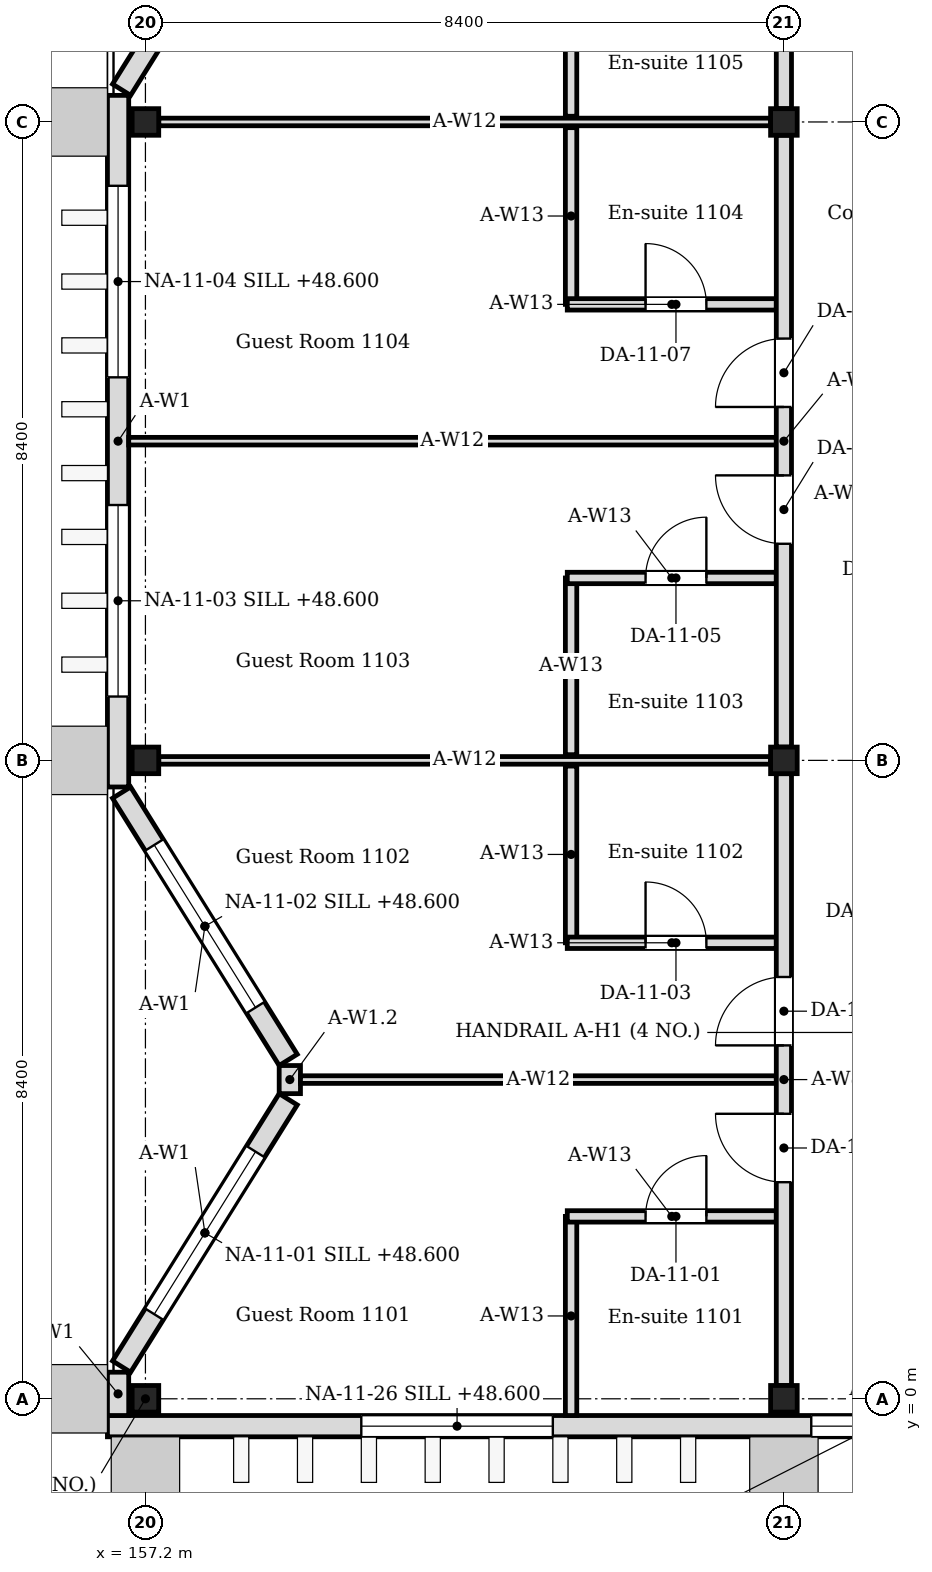
"""IFC4 building model, lengths in metres.
Left out: names, types, materials, properties, quantities, classifications, styles, units other than length and angle.
Written with IfcOpenShell. Run it as: python <this file> out.ifc"""

import sys

from ifc_helpers import new_model, si_unit, direction, frame, frame_2d, origin, origin_2d, place, context, subcontext, project, spatial, rectangle, i_section, extrude, element, fill, save


model = new_model("IFC4")
c1 = context("Model", 3, precision=1e-05, world=origin(), true_north=direction((0.0, 1.0)))
c2 = subcontext(c1, "Body", "Model", "MODEL_VIEW")
j1 = project(units=[si_unit("LENGTHUNIT", "METRE"), si_unit("PLANEANGLEUNIT", "RADIAN")], contexts=[c1])
p1 = place(None, origin())
s1 = spatial("IfcSite", under=j1, at=p1, CompositionType="ELEMENT")
p2 = place(p1, origin())
s2 = spatial("IfcBuilding", under=s1, at=p2, CompositionType="ELEMENT")
p3 = place(p2, frame((0.0, 0.0, 48.0)))
s3 = spatial("IfcBuildingStorey", under=s2, at=p3, CompositionType="ELEMENT", Elevation=48.0)
for number, where, z_axis, x_axis in (
    (1, (157.2, 0.0, 0.0), (0.0, 0.0, 1.0), (1.0, 0.0, 0.0)),
    (2, (157.2, 8.4, 0.0), (0.0, 0.0, 1.0), (1.0, 0.0, 0.0)),
    (3, (157.2, 16.8, 0.0), (0.0, 0.0, 1.0), (1.0, 0.0, 0.0)),
    (4, (165.6, 0.0, 0.0), (0.0, 0.0, 1.0), (1.0, 0.0, 0.0)),
    (5, (165.6, 8.4, 0.0), (0.0, 0.0, 1.0), (1.0, 0.0, 0.0)),
    (6, (165.6, 16.8, 0.0), (0.0, 0.0, 1.0), (1.0, 0.0, 0.0)),
):
    element("IfcColumn", number, at=place(p3, frame(where, z_axis=z_axis, x_axis=x_axis)), inside=s3, PredefinedType="COLUMN", context=c2, shape_type="SweptSolid", body=[
        extrude(i_section(OverallWidth=0.35, OverallDepth=0.35, WebThickness=0.012, FlangeThickness=0.019, FilletRadius=0.013, at=origin_2d()), origin(), (0.0, 0.0, 1.0), 4.2),
    ])
p4 = place(p3, frame((156.84, -0.22, 0.0), z_axis=(0.0, 0.0, 1.0), x_axis=(0.0, 1.0, 0.0)))
e7 = element("IfcWall", 7, at=p4, inside=s3, PredefinedType="SOLIDWALL", context=c2, shape_type="SweptSolid", body=[
    extrude(rectangle(XDim=0.57, YDim=0.28, at=frame_2d((0.285, 0.0))), origin(), (0.0, 0.0, 1.0), 4.05),
])
p5 = place(p3, frame((156.886, 0.424, 0.0), z_axis=(0.0, 0.0, 1.0), x_axis=(0.529018946142, 0.848610013271, 0.0)))
e8 = element("IfcWall", 8, at=p5, inside=s3, PredefinedType="SOLIDWALL", context=c2, shape_type="SweptSolid", body=[
    extrude(rectangle(XDim=4.144, YDim=0.28, at=frame_2d((2.072, 0.0))), origin(), (0.0, 0.0, 1.0), 4.05),
])
p6 = place(p5, frame((0.812, 0.0, 0.6)))
e9 = element("IfcOpeningElement", 9, at=p6, cuts=e8, PredefinedType="OPENING", context=c2, shape_type="SweptSolid", body=[
    extrude(rectangle(XDim=2.52, YDim=2.4, at=frame_2d((1.26, 1.2))), frame((0.0, 0.15, 0.0), z_axis=(0.0, -1.0, 0.0), x_axis=(1.0, 0.0, 0.0)), (0.0, 0.0, 1.0), 0.3),
])
p7 = place(p3, frame((159.079, 4.459, 0.0), z_axis=(0.0, 0.0, 1.0), x_axis=(-0.529018946142, 0.848610013271, 0.0)))
e10 = element("IfcWall", 10, at=p7, inside=s3, PredefinedType="SOLIDWALL", context=c2, shape_type="SweptSolid", body=[
    extrude(rectangle(XDim=4.144, YDim=0.28, at=frame_2d((2.072, 0.0))), origin(), (0.0, 0.0, 1.0), 4.05),
])
p8 = place(p7, frame((0.812, 0.0, 0.6)))
e11 = element("IfcOpeningElement", 11, at=p8, cuts=e10, PredefinedType="OPENING", context=c2, shape_type="SweptSolid", body=[
    extrude(rectangle(XDim=2.52, YDim=2.4, at=frame_2d((1.26, 1.2))), frame((0.0, 0.15, 0.0), z_axis=(0.0, -1.0, 0.0), x_axis=(1.0, 0.0, 0.0)), (0.0, 0.0, 1.0), 0.3),
])
p9 = place(p3, frame((159.1, 4.015, 0.0), z_axis=(0.0, 0.0, 1.0), x_axis=(0.0, 1.0, 0.0)))
e12 = element("IfcWall", 12, at=p9, inside=s3, PredefinedType="SOLIDWALL", context=c2, shape_type="SweptSolid", body=[
    extrude(rectangle(XDim=0.37, YDim=0.28, at=frame_2d((0.185, 0.0))), origin(), (0.0, 0.0, 1.0), 3.604),
])
p10 = place(p3, frame((156.84, 8.05, 0.0), z_axis=(0.0, 0.0, 1.0), x_axis=(0.0, 1.0, 0.0)))
e13 = element("IfcWall", 13, at=p10, inside=s3, PredefinedType="SOLIDWALL", context=c2, shape_type="SweptSolid", body=[
    extrude(rectangle(XDim=9.1, YDim=0.28, at=frame_2d((4.55, 0.0))), origin(), (0.0, 0.0, 1.0), 4.05),
])
p11 = place(p10, frame((1.19, 0.0, 0.6)))
e14 = element("IfcOpeningElement", 14, at=p11, cuts=e13, PredefinedType="OPENING", context=c2, shape_type="SweptSolid", body=[
    extrude(rectangle(XDim=2.52, YDim=2.4, at=frame_2d((1.26, 1.2))), frame((0.0, 0.15, 0.0), z_axis=(0.0, -1.0, 0.0), x_axis=(1.0, 0.0, 0.0)), (0.0, 0.0, 1.0), 0.3),
])
p12 = place(p10, frame((5.39, 0.0, 0.6)))
e15 = element("IfcOpeningElement", 15, at=p12, cuts=e13, PredefinedType="OPENING", context=c2, shape_type="SweptSolid", body=[
    extrude(rectangle(XDim=2.52, YDim=2.4, at=frame_2d((1.26, 1.2))), frame((0.0, 0.15, 0.0), z_axis=(0.0, -1.0, 0.0), x_axis=(1.0, 0.0, 0.0)), (0.0, 0.0, 1.0), 0.3),
])
p13 = place(p3, frame((156.886, 17.224, 0.0), z_axis=(0.0, 0.0, 1.0), x_axis=(0.529018946142, 0.848610013271, 0.0)))
e16 = element("IfcWall", 16, at=p13, inside=s3, PredefinedType="SOLIDWALL", context=c2, shape_type="SweptSolid", body=[
    extrude(rectangle(XDim=4.144, YDim=0.28, at=frame_2d((2.072, 0.0))), origin(), (0.0, 0.0, 1.0), 4.05),
])
p14 = place(p13, frame((0.812, 0.0, 0.6)))
e17 = element("IfcOpeningElement", 17, at=p14, cuts=e16, PredefinedType="OPENING", context=c2, shape_type="SweptSolid", body=[
    extrude(rectangle(XDim=2.52, YDim=2.4, at=frame_2d((1.26, 1.2))), frame((0.0, 0.15, 0.0), z_axis=(0.0, -1.0, 0.0), x_axis=(1.0, 0.0, 0.0)), (0.0, 0.0, 1.0), 0.3),
])
p15 = place(p3, frame((156.7, -0.36, 0.0), z_axis=(0.0, 0.0, 1.0), x_axis=(1.0, 0.0, 0.0)))
e18 = element("IfcWall", 18, at=p15, inside=s3, PredefinedType="SOLIDWALL", context=c2, shape_type="SweptSolid", body=[
    extrude(rectangle(XDim=20.2, YDim=0.28, at=frame_2d((10.1, 0.0))), origin(), (0.0, 0.0, 1.0), 4.05),
])
p16 = place(p15, frame((9.26, 0.0, 0.6)))
e19 = element("IfcOpeningElement", 19, at=p16, cuts=e18, PredefinedType="OPENING", context=c2, shape_type="SweptSolid", body=[
    extrude(rectangle(XDim=1.68, YDim=2.4, at=frame_2d((0.84, 1.2))), frame((0.0, 0.15, 0.0), z_axis=(0.0, -1.0, 0.0), x_axis=(1.0, 0.0, 0.0)), (0.0, 0.0, 1.0), 0.3),
])
p17 = place(p15, frame((3.34, 0.0, 0.6)))
e20 = element("IfcOpeningElement", 20, at=p17, cuts=e18, PredefinedType="OPENING", context=c2, shape_type="SweptSolid", body=[
    extrude(rectangle(XDim=2.52, YDim=2.4, at=frame_2d((1.26, 1.2))), frame((0.0, 0.15, 0.0), z_axis=(0.0, -1.0, 0.0), x_axis=(1.0, 0.0, 0.0)), (0.0, 0.0, 1.0), 0.3),
])
p18 = place(p3, frame((162.8, -0.22, 0.0), z_axis=(0.0, 0.0, 1.0), x_axis=(0.0, 1.0, 0.0)))
e21 = element("IfcWall", 21, at=p18, inside=s3, PredefinedType="PARTITIONING", context=c2, shape_type="SweptSolid", body=[
    extrude(rectangle(XDim=2.62, YDim=0.15, at=frame_2d((1.31, 0.0))), origin(), (0.0, 0.0, 1.0), 4.05),
])
p19 = place(p3, frame((162.75, 2.4, 0.0), z_axis=(0.0, 0.0, 1.0), x_axis=(1.0, 0.0, 0.0)))
e22 = element("IfcWall", 22, at=p19, inside=s3, PredefinedType="PARTITIONING", context=c2, shape_type="SweptSolid", body=[
    extrude(rectangle(XDim=2.75, YDim=0.15, at=frame_2d((1.375, 0.0))), origin(), (0.0, 0.0, 1.0), 4.05),
])
p20 = place(p19, frame((1.03, 0.0, 0.0)))
e23 = element("IfcOpeningElement", 23, at=p20, cuts=e22, PredefinedType="OPENING", context=c2, shape_type="SweptSolid", body=[
    extrude(rectangle(XDim=0.8, YDim=2.1, at=frame_2d((0.4, 1.05))), frame((0.0, 0.085, 0.0), z_axis=(0.0, -1.0, 0.0), x_axis=(1.0, 0.0, 0.0)), (0.0, 0.0, 1.0), 0.17),
])
p21 = place(p3, frame((162.8, 6.0, 0.0), z_axis=(0.0, 0.0, 1.0), x_axis=(0.0, 1.0, 0.0)))
e24 = element("IfcWall", 24, at=p21, inside=s3, PredefinedType="PARTITIONING", context=c2, shape_type="SweptSolid", body=[
    extrude(rectangle(XDim=2.325, YDim=0.15, at=frame_2d((1.163, 0.0))), origin(), (0.0, 0.0, 1.0), 4.05),
])
p22 = place(p3, frame((162.75, 6.0, 0.0), z_axis=(0.0, 0.0, 1.0), x_axis=(1.0, 0.0, 0.0)))
e25 = element("IfcWall", 25, at=p22, inside=s3, PredefinedType="PARTITIONING", context=c2, shape_type="SweptSolid", body=[
    extrude(rectangle(XDim=2.75, YDim=0.15, at=frame_2d((1.375, 0.0))), origin(), (0.0, 0.0, 1.0), 4.05),
])
p23 = place(p22, frame((1.03, 0.0, 0.0)))
e26 = element("IfcOpeningElement", 26, at=p23, cuts=e25, PredefinedType="OPENING", context=c2, shape_type="SweptSolid", body=[
    extrude(rectangle(XDim=0.8, YDim=2.1, at=frame_2d((0.4, 1.05))), frame((0.0, 0.085, 0.0), z_axis=(0.0, -1.0, 0.0), x_axis=(1.0, 0.0, 0.0)), (0.0, 0.0, 1.0), 0.17),
])
p24 = place(p3, frame((162.8, 8.475, 0.0), z_axis=(0.0, 0.0, 1.0), x_axis=(0.0, 1.0, 0.0)))
e27 = element("IfcWall", 27, at=p24, inside=s3, PredefinedType="PARTITIONING", context=c2, shape_type="SweptSolid", body=[
    extrude(rectangle(XDim=2.325, YDim=0.15, at=frame_2d((1.163, 0.0))), origin(), (0.0, 0.0, 1.0), 4.05),
])
p25 = place(p3, frame((162.75, 10.8, 0.0), z_axis=(0.0, 0.0, 1.0), x_axis=(1.0, 0.0, 0.0)))
e28 = element("IfcWall", 28, at=p25, inside=s3, PredefinedType="PARTITIONING", context=c2, shape_type="SweptSolid", body=[
    extrude(rectangle(XDim=2.75, YDim=0.15, at=frame_2d((1.375, 0.0))), origin(), (0.0, 0.0, 1.0), 4.05),
])
p26 = place(p25, frame((1.03, 0.0, 0.0)))
e29 = element("IfcOpeningElement", 29, at=p26, cuts=e28, PredefinedType="OPENING", context=c2, shape_type="SweptSolid", body=[
    extrude(rectangle(XDim=0.8, YDim=2.1, at=frame_2d((0.4, 1.05))), frame((0.0, 0.085, 0.0), z_axis=(0.0, -1.0, 0.0), x_axis=(1.0, 0.0, 0.0)), (0.0, 0.0, 1.0), 0.17),
])
p27 = place(p3, frame((162.8, 14.4, 0.0), z_axis=(0.0, 0.0, 1.0), x_axis=(0.0, 1.0, 0.0)))
e30 = element("IfcWall", 30, at=p27, inside=s3, PredefinedType="PARTITIONING", context=c2, shape_type="SweptSolid", body=[
    extrude(rectangle(XDim=2.325, YDim=0.15, at=frame_2d((1.163, 0.0))), origin(), (0.0, 0.0, 1.0), 4.05),
])
p28 = place(p3, frame((162.75, 14.4, 0.0), z_axis=(0.0, 0.0, 1.0), x_axis=(1.0, 0.0, 0.0)))
e31 = element("IfcWall", 31, at=p28, inside=s3, PredefinedType="PARTITIONING", context=c2, shape_type="SweptSolid", body=[
    extrude(rectangle(XDim=2.75, YDim=0.15, at=frame_2d((1.375, 0.0))), origin(), (0.0, 0.0, 1.0), 4.05),
])
p29 = place(p28, frame((1.03, 0.0, 0.0)))
e32 = element("IfcOpeningElement", 32, at=p29, cuts=e31, PredefinedType="OPENING", context=c2, shape_type="SweptSolid", body=[
    extrude(rectangle(XDim=0.8, YDim=2.1, at=frame_2d((0.4, 1.05))), frame((0.0, 0.085, 0.0), z_axis=(0.0, -1.0, 0.0), x_axis=(1.0, 0.0, 0.0)), (0.0, 0.0, 1.0), 0.17),
])
p30 = place(p3, frame((162.8, 16.875, 0.0), z_axis=(0.0, 0.0, 1.0), x_axis=(0.0, 1.0, 0.0)))
e33 = element("IfcWall", 33, at=p30, inside=s3, PredefinedType="PARTITIONING", context=c2, shape_type="SweptSolid", body=[
    extrude(rectangle(XDim=2.325, YDim=0.15, at=frame_2d((1.163, 0.0))), origin(), (0.0, 0.0, 1.0), 4.05),
])
for number, where, z_axis, x_axis in (
    (34, (157.375, 8.4, 0.0), (0.0, 0.0, 1.0), (1.0, 0.0, 0.0)),
    (35, (157.375, 16.8, 0.0), (0.0, 0.0, 1.0), (1.0, 0.0, 0.0)),
):
    element("IfcWall", number, at=place(p3, frame(where, z_axis=z_axis, x_axis=x_axis)), inside=s3, PredefinedType="PARTITIONING", context=c2, shape_type="SweptSolid", body=[
        extrude(rectangle(XDim=8.05, YDim=0.1, at=frame_2d((4.025, 0.0))), origin(), (0.0, 0.0, 1.0), 3.604),
    ])
p31 = place(p3, frame((159.24, 4.2, 0.0), z_axis=(0.0, 0.0, 1.0), x_axis=(1.0, 0.0, 0.0)))
e36 = element("IfcWall", 36, at=p31, inside=s3, PredefinedType="PARTITIONING", context=c2, shape_type="SweptSolid", body=[
    extrude(rectangle(XDim=6.26, YDim=0.1, at=frame_2d((3.13, 0.0))), origin(), (0.0, 0.0, 1.0), 3.604),
])
p32 = place(p3, frame((156.98, 12.6, 0.0), z_axis=(0.0, 0.0, 1.0), x_axis=(1.0, 0.0, 0.0)))
e37 = element("IfcWall", 37, at=p32, inside=s3, PredefinedType="PARTITIONING", context=c2, shape_type="SweptSolid", body=[
    extrude(rectangle(XDim=8.52, YDim=0.1, at=frame_2d((4.26, 0.0))), origin(), (0.0, 0.0, 1.0), 3.604),
])
p33 = place(p3, frame((165.6, 0.175, 0.0), z_axis=(0.0, 0.0, 1.0), x_axis=(0.0, 1.0, 0.0)))
e38 = element("IfcWall", 38, at=p33, inside=s3, PredefinedType="PARTITIONING", context=c2, shape_type="SweptSolid", body=[
    extrude(rectangle(XDim=8.05, YDim=0.2, at=frame_2d((4.025, 0.0))), origin(), (0.0, 0.0, 1.0), 3.45),
])
p34 = place(p33, frame((2.675, 0.0, 0.0)))
e39 = element("IfcOpeningElement", 39, at=p34, cuts=e38, PredefinedType="OPENING", context=c2, shape_type="SweptSolid", body=[
    extrude(rectangle(XDim=0.9, YDim=2.1, at=frame_2d((0.45, 1.05))), frame((0.0, 0.11, 0.0), z_axis=(0.0, -1.0, 0.0), x_axis=(1.0, 0.0, 0.0)), (0.0, 0.0, 1.0), 0.22),
])
p35 = place(p33, frame((4.475, 0.0, 0.0)))
e40 = element("IfcOpeningElement", 40, at=p35, cuts=e38, PredefinedType="OPENING", context=c2, shape_type="SweptSolid", body=[
    extrude(rectangle(XDim=0.9, YDim=2.1, at=frame_2d((0.45, 1.05))), frame((0.0, 0.11, 0.0), z_axis=(0.0, -1.0, 0.0), x_axis=(1.0, 0.0, 0.0)), (0.0, 0.0, 1.0), 0.22),
])
p36 = place(p3, frame((165.6, 8.575, 0.0), z_axis=(0.0, 0.0, 1.0), x_axis=(0.0, 1.0, 0.0)))
e41 = element("IfcWall", 41, at=p36, inside=s3, PredefinedType="PARTITIONING", context=c2, shape_type="SweptSolid", body=[
    extrude(rectangle(XDim=8.05, YDim=0.2, at=frame_2d((4.025, 0.0))), origin(), (0.0, 0.0, 1.0), 3.45),
])
p37 = place(p36, frame((2.675, 0.0, 0.0)))
e42 = element("IfcOpeningElement", 42, at=p37, cuts=e41, PredefinedType="OPENING", context=c2, shape_type="SweptSolid", body=[
    extrude(rectangle(XDim=0.9, YDim=2.1, at=frame_2d((0.45, 1.05))), frame((0.0, 0.11, 0.0), z_axis=(0.0, -1.0, 0.0), x_axis=(1.0, 0.0, 0.0)), (0.0, 0.0, 1.0), 0.22),
])
p38 = place(p36, frame((4.475, 0.0, 0.0)))
e43 = element("IfcOpeningElement", 43, at=p38, cuts=e41, PredefinedType="OPENING", context=c2, shape_type="SweptSolid", body=[
    extrude(rectangle(XDim=0.9, YDim=2.1, at=frame_2d((0.45, 1.05))), frame((0.0, 0.11, 0.0), z_axis=(0.0, -1.0, 0.0), x_axis=(1.0, 0.0, 0.0)), (0.0, 0.0, 1.0), 0.22),
])
p39 = place(p3, frame((165.6, 16.975, 0.0), z_axis=(0.0, 0.0, 1.0), x_axis=(0.0, 1.0, 0.0)))
e44 = element("IfcWall", 44, at=p39, inside=s3, PredefinedType="PARTITIONING", context=c2, shape_type="SweptSolid", body=[
    extrude(rectangle(XDim=8.05, YDim=0.2, at=frame_2d((4.025, 0.0))), origin(), (0.0, 0.0, 1.0), 3.45),
])
p40 = place(p39, frame((2.675, 0.0, 0.0)))
e45 = element("IfcOpeningElement", 45, at=p40, cuts=e44, PredefinedType="OPENING", context=c2, shape_type="SweptSolid", body=[
    extrude(rectangle(XDim=0.9, YDim=2.1, at=frame_2d((0.45, 1.05))), frame((0.0, 0.11, 0.0), z_axis=(0.0, -1.0, 0.0), x_axis=(1.0, 0.0, 0.0)), (0.0, 0.0, 1.0), 0.22),
])
p41 = place(p39, frame((4.475, 0.0, 0.0)))
e46 = element("IfcOpeningElement", 46, at=p41, cuts=e44, PredefinedType="OPENING", context=c2, shape_type="SweptSolid", body=[
    extrude(rectangle(XDim=0.9, YDim=2.1, at=frame_2d((0.45, 1.05))), frame((0.0, 0.11, 0.0), z_axis=(0.0, -1.0, 0.0), x_axis=(1.0, 0.0, 0.0)), (0.0, 0.0, 1.0), 0.22),
])
p42 = place(p6, origin())
e47 = element("IfcWindow", 47, at=p42, inside=s3, PartitioningType="SINGLE_PANEL", PredefinedType="WINDOW", context=c2, shape_type="SweptSolid", body=[
    extrude(rectangle(XDim=2.52, YDim=2.4, at=frame_2d((1.26, 1.2))), frame((0.0, 0.03, 0.0), z_axis=(0.0, -1.0, 0.0), x_axis=(1.0, 0.0, 0.0)), (0.0, 0.0, 1.0), 0.06),
])
fill(e9, e47)
p43 = place(p8, origin())
e48 = element("IfcWindow", 48, at=p43, inside=s3, PartitioningType="SINGLE_PANEL", PredefinedType="WINDOW", context=c2, shape_type="SweptSolid", body=[
    extrude(rectangle(XDim=2.52, YDim=2.4, at=frame_2d((1.26, 1.2))), frame((0.0, 0.03, 0.0), z_axis=(0.0, -1.0, 0.0), x_axis=(1.0, 0.0, 0.0)), (0.0, 0.0, 1.0), 0.06),
])
fill(e11, e48)
p44 = place(p11, origin())
e49 = element("IfcWindow", 49, at=p44, inside=s3, PartitioningType="SINGLE_PANEL", PredefinedType="WINDOW", context=c2, shape_type="SweptSolid", body=[
    extrude(rectangle(XDim=2.52, YDim=2.4, at=frame_2d((1.26, 1.2))), frame((0.0, 0.03, 0.0), z_axis=(0.0, -1.0, 0.0), x_axis=(1.0, 0.0, 0.0)), (0.0, 0.0, 1.0), 0.06),
])
fill(e14, e49)
p45 = place(p12, origin())
e50 = element("IfcWindow", 50, at=p45, inside=s3, PartitioningType="SINGLE_PANEL", PredefinedType="WINDOW", context=c2, shape_type="SweptSolid", body=[
    extrude(rectangle(XDim=2.52, YDim=2.4, at=frame_2d((1.26, 1.2))), frame((0.0, 0.03, 0.0), z_axis=(0.0, -1.0, 0.0), x_axis=(1.0, 0.0, 0.0)), (0.0, 0.0, 1.0), 0.06),
])
fill(e15, e50)
p46 = place(p16, origin())
e51 = element("IfcWindow", 51, at=p46, inside=s3, PartitioningType="SINGLE_PANEL", PredefinedType="WINDOW", context=c2, shape_type="SweptSolid", body=[
    extrude(rectangle(XDim=1.68, YDim=2.4, at=frame_2d((0.84, 1.2))), frame((0.0, 0.03, 0.0), z_axis=(0.0, -1.0, 0.0), x_axis=(1.0, 0.0, 0.0)), (0.0, 0.0, 1.0), 0.06),
])
fill(e19, e51)
p47 = place(p17, origin())
e52 = element("IfcWindow", 52, at=p47, inside=s3, PartitioningType="SINGLE_PANEL", PredefinedType="WINDOW", context=c2, shape_type="SweptSolid", body=[
    extrude(rectangle(XDim=2.52, YDim=2.4, at=frame_2d((1.26, 1.2))), frame((0.0, 0.03, 0.0), z_axis=(0.0, -1.0, 0.0), x_axis=(1.0, 0.0, 0.0)), (0.0, 0.0, 1.0), 0.06),
])
fill(e20, e52)
p48 = place(p20, origin())
e53 = element("IfcDoor", 53, at=p48, inside=s3, OperationType="SINGLE_SWING_RIGHT", PredefinedType="DOOR", context=c2, shape_type="SweptSolid", body=[
    extrude(rectangle(XDim=0.8, YDim=2.1, at=frame_2d((0.4, 1.05))), frame((0.0, 0.025, 0.0), z_axis=(0.0, -1.0, 0.0), x_axis=(1.0, 0.0, 0.0)), (0.0, 0.0, 1.0), 0.05),
])
fill(e23, e53)
p49 = place(p34, origin())
e54 = element("IfcDoor", 54, at=p49, inside=s3, OperationType="SINGLE_SWING_RIGHT", PredefinedType="DOOR", context=c2, shape_type="SweptSolid", body=[
    extrude(rectangle(XDim=0.9, YDim=2.1, at=frame_2d((0.45, 1.05))), frame((0.0, 0.025, 0.0), z_axis=(0.0, -1.0, 0.0), x_axis=(1.0, 0.0, 0.0)), (0.0, 0.0, 1.0), 0.05),
])
fill(e39, e54)
p50 = place(p23, origin())
e55 = element("IfcDoor", 55, at=p50, inside=s3, OperationType="SINGLE_SWING_LEFT", PredefinedType="DOOR", context=c2, shape_type="SweptSolid", body=[
    extrude(rectangle(XDim=0.8, YDim=2.1, at=frame_2d((0.4, 1.05))), frame((0.0, 0.025, 0.0), z_axis=(0.0, -1.0, 0.0), x_axis=(1.0, 0.0, 0.0)), (0.0, 0.0, 1.0), 0.05),
])
fill(e26, e55)
p51 = place(p35, origin())
e56 = element("IfcDoor", 56, at=p51, inside=s3, OperationType="SINGLE_SWING_LEFT", PredefinedType="DOOR", context=c2, shape_type="SweptSolid", body=[
    extrude(rectangle(XDim=0.9, YDim=2.1, at=frame_2d((0.45, 1.05))), frame((0.0, 0.025, 0.0), z_axis=(0.0, -1.0, 0.0), x_axis=(1.0, 0.0, 0.0)), (0.0, 0.0, 1.0), 0.05),
])
fill(e40, e56)
p52 = place(p26, origin())
e57 = element("IfcDoor", 57, at=p52, inside=s3, OperationType="SINGLE_SWING_RIGHT", PredefinedType="DOOR", context=c2, shape_type="SweptSolid", body=[
    extrude(rectangle(XDim=0.8, YDim=2.1, at=frame_2d((0.4, 1.05))), frame((0.0, 0.025, 0.0), z_axis=(0.0, -1.0, 0.0), x_axis=(1.0, 0.0, 0.0)), (0.0, 0.0, 1.0), 0.05),
])
fill(e29, e57)
p53 = place(p37, origin())
e58 = element("IfcDoor", 58, at=p53, inside=s3, OperationType="SINGLE_SWING_RIGHT", PredefinedType="DOOR", context=c2, shape_type="SweptSolid", body=[
    extrude(rectangle(XDim=0.9, YDim=2.1, at=frame_2d((0.45, 1.05))), frame((0.0, 0.025, 0.0), z_axis=(0.0, -1.0, 0.0), x_axis=(1.0, 0.0, 0.0)), (0.0, 0.0, 1.0), 0.05),
])
fill(e42, e58)
p54 = place(p29, origin())
e59 = element("IfcDoor", 59, at=p54, inside=s3, OperationType="SINGLE_SWING_LEFT", PredefinedType="DOOR", context=c2, shape_type="SweptSolid", body=[
    extrude(rectangle(XDim=0.8, YDim=2.1, at=frame_2d((0.4, 1.05))), frame((0.0, 0.025, 0.0), z_axis=(0.0, -1.0, 0.0), x_axis=(1.0, 0.0, 0.0)), (0.0, 0.0, 1.0), 0.05),
])
fill(e32, e59)
p55 = place(p38, origin())
e60 = element("IfcDoor", 60, at=p55, inside=s3, OperationType="SINGLE_SWING_LEFT", PredefinedType="DOOR", context=c2, shape_type="SweptSolid", body=[
    extrude(rectangle(XDim=0.9, YDim=2.1, at=frame_2d((0.45, 1.05))), frame((0.0, 0.025, 0.0), z_axis=(0.0, -1.0, 0.0), x_axis=(1.0, 0.0, 0.0)), (0.0, 0.0, 1.0), 0.05),
])
fill(e43, e60)
save(model, sys.argv[1])
